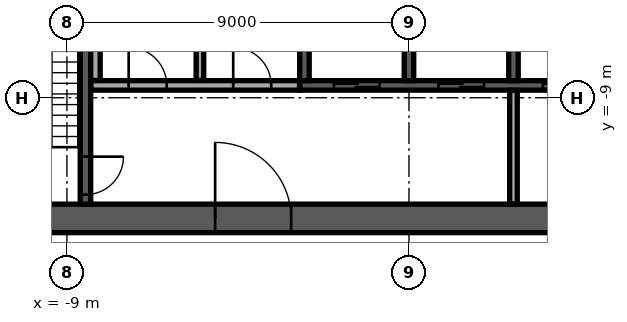
"""IFC4 building model, lengths in metres.
Left out: names, types, materials, properties, quantities, classifications, styles, units other than length and angle.
Written with IfcOpenShell. Run it as: python <this file> out.ifc"""

import sys

from ifc_helpers import new_model, si_unit, direction, frame, frame_2d, origin, place, context, subcontext, project, spatial, rectangle, extrude, element, fill, save


model = new_model("IFC4")
c1 = context("Model", 3, precision=1e-05, world=origin(), true_north=direction((0.0, 1.0)))
c2 = subcontext(c1, "Body", "Model", "MODEL_VIEW")
j1 = project(units=[si_unit("LENGTHUNIT", "METRE"), si_unit("PLANEANGLEUNIT", "RADIAN")], contexts=[c1])
p1 = place(None, origin())
s1 = spatial("IfcSite", under=j1, at=p1, CompositionType="ELEMENT")
p2 = place(p1, origin())
s2 = spatial("IfcBuilding", under=s1, at=p2, CompositionType="ELEMENT")
p3 = place(p2, frame((0.0, 0.0, 262.9)))
s3 = spatial("IfcBuildingStorey", under=s2, at=p3, CompositionType="ELEMENT", Elevation=262.9)
p4 = place(p3, frame((-12.55, -12.175, 0.0), z_axis=(0.0, 0.0, 1.0), x_axis=(1.0, 0.0, 0.0)))
e1 = element("IfcWall", 1, at=p4, inside=s3, PredefinedType="SHEAR", context=c2, shape_type="SweptSolid", body=[
    extrude(rectangle(XDim=25.1, YDim=0.75, at=frame_2d((12.55, 0.0))), origin(), (0.0, 0.0, 1.0), 3.64),
])
p5 = place(p4, frame((7.45, 0.0, 0.0)))
e2 = element("IfcOpeningElement", 2, at=p5, cuts=e1, PredefinedType="OPENING", context=c2, shape_type="SweptSolid", body=[
    extrude(rectangle(XDim=2.0, YDim=2.1, at=frame_2d((1.0, 1.05))), frame((0.0, 0.385, 0.0), z_axis=(0.0, -1.0, 0.0), x_axis=(1.0, 0.0, 0.0)), (0.0, 0.0, 1.0), 0.77),
])
p6 = place(p4, frame((17.575, 0.0, 0.0)))
e3 = element("IfcOpeningElement", 3, at=p6, cuts=e1, PredefinedType="OPENING", context=c2, shape_type="SweptSolid", body=[
    extrude(rectangle(XDim=1.2, YDim=2.1, at=frame_2d((0.6, 1.05))), frame((0.0, 0.385, 0.0), z_axis=(0.0, -1.0, 0.0), x_axis=(1.0, 0.0, 0.0)), (0.0, 0.0, 1.0), 0.77),
])
p7 = place(p4, frame((1.725, 0.0, 0.0)))
e4 = element("IfcOpeningElement", 4, at=p7, cuts=e1, PredefinedType="OPENING", context=c2, shape_type="SweptSolid", body=[
    extrude(rectangle(XDim=1.2, YDim=2.1, at=frame_2d((0.6, 1.05))), frame((0.0, 0.385, 0.0), z_axis=(0.0, -1.0, 0.0), x_axis=(1.0, 0.0, 0.0)), (0.0, 0.0, 1.0), 0.77),
])
p8 = place(p4, frame((22.175, 0.0, 0.0)))
e5 = element("IfcOpeningElement", 5, at=p8, cuts=e1, PredefinedType="OPENING", context=c2, shape_type="SweptSolid", body=[
    extrude(rectangle(XDim=1.2, YDim=2.1, at=frame_2d((0.6, 1.05))), frame((0.0, 0.385, 0.0), z_axis=(0.0, -1.0, 0.0), x_axis=(1.0, 0.0, 0.0)), (0.0, 0.0, 1.0), 0.77),
])
p9 = place(p3, frame((-2.875, -8.675, 0.0), z_axis=(0.0, 0.0, 1.0), x_axis=(1.0, 0.0, 0.0)))
e6 = element("IfcWall", 6, at=p9, inside=s3, PredefinedType="SOLIDWALL", context=c2, shape_type="SweptSolid", body=[
    extrude(rectangle(XDim=11.25, YDim=0.25, at=frame_2d((5.625, 0.0))), origin(), (0.0, 0.0, 1.0), 3.64),
])
p10 = place(p9, frame((0.9, 0.0, 0.0)))
e7 = element("IfcOpeningElement", 7, at=p10, cuts=e6, PredefinedType="OPENING", context=c2, shape_type="SweptSolid", body=[
    extrude(rectangle(XDim=1.2, YDim=2.1, at=frame_2d((0.6, 1.05))), frame((0.0, 0.135, 0.0), z_axis=(0.0, -1.0, 0.0), x_axis=(1.0, 0.0, 0.0)), (0.0, 0.0, 1.0), 0.27),
])
p11 = place(p9, frame((3.65, 0.0, 0.0)))
e8 = element("IfcOpeningElement", 8, at=p11, cuts=e6, PredefinedType="OPENING", context=c2, shape_type="SweptSolid", body=[
    extrude(rectangle(XDim=1.2, YDim=2.1, at=frame_2d((0.6, 1.05))), frame((0.0, 0.135, 0.0), z_axis=(0.0, -1.0, 0.0), x_axis=(1.0, 0.0, 0.0)), (0.0, 0.0, 1.0), 0.27),
])
p12 = place(p9, frame((6.4, 0.0, 0.0)))
e9 = element("IfcOpeningElement", 9, at=p12, cuts=e6, PredefinedType="OPENING", context=c2, shape_type="SweptSolid", body=[
    extrude(rectangle(XDim=1.2, YDim=2.1, at=frame_2d((0.6, 1.05))), frame((0.0, 0.135, 0.0), z_axis=(0.0, -1.0, 0.0), x_axis=(1.0, 0.0, 0.0)), (0.0, 0.0, 1.0), 0.27),
])
p13 = place(p9, frame((9.15, 0.0, 0.0)))
e10 = element("IfcOpeningElement", 10, at=p13, cuts=e6, PredefinedType="OPENING", context=c2, shape_type="SweptSolid", body=[
    extrude(rectangle(XDim=1.2, YDim=2.1, at=frame_2d((0.6, 1.05))), frame((0.0, 0.135, 0.0), z_axis=(0.0, -1.0, 0.0), x_axis=(1.0, 0.0, 0.0)), (0.0, 0.0, 1.0), 0.27),
])
for number, where, z_axis, x_axis in (
    (11, (-2.75, -8.55, 0.0), (0.0, 0.0, 1.0), (0.0, 1.0, 0.0)),
    (12, (0.0, -8.55, 0.0), (0.0, 0.0, 1.0), (0.0, 1.0, 0.0)),
    (13, (2.75, -8.55, 0.0), (0.0, 0.0, 1.0), (0.0, 1.0, 0.0)),
):
    element("IfcWall", number, at=place(p3, frame(where, z_axis=z_axis, x_axis=x_axis)), inside=s3, PredefinedType="SOLIDWALL", context=c2, shape_type="SweptSolid", body=[
        extrude(rectangle(XDim=2.7, YDim=0.25, at=frame_2d((1.35, 0.0))), origin(), (0.0, 0.0, 1.0), 3.64),
    ])
p14 = place(p3, frame((-8.512, -4.55, 0.0), z_axis=(0.0, 0.0, 1.0), x_axis=(0.0, -1.0, 0.0)))
e14 = element("IfcWall", 14, at=p14, inside=s3, PredefinedType="SOLIDWALL", context=c2, shape_type="SweptSolid", body=[
    extrude(rectangle(XDim=7.25, YDim=0.275, at=frame_2d((3.625, 0.0))), origin(), (0.0, 0.0, 1.0), 3.64),
])
p15 = place(p14, frame((6.0, 0.0, 0.0)))
e15 = element("IfcOpeningElement", 15, at=p15, cuts=e14, PredefinedType="OPENING", context=c2, shape_type="SweptSolid", body=[
    extrude(rectangle(XDim=1.0, YDim=2.1, at=frame_2d((0.5, 1.05))), frame((0.0, 0.147, 0.0), z_axis=(0.0, -1.0, 0.0), x_axis=(1.0, 0.0, 0.0)), (0.0, 0.0, 1.0), 0.295),
])
p16 = place(p3, frame((2.75, -11.795, 0.0), z_axis=(0.0, 0.0, 1.0), x_axis=(0.0, 1.0, 0.0)))
e16 = element("IfcWall", 16, at=p16, inside=s3, PredefinedType="PARTITIONING", context=c2, shape_type="SweptSolid", body=[
    extrude(rectangle(XDim=2.99, YDim=0.2, at=frame_2d((1.495, 0.0))), origin(), (0.0, 0.0, 1.0), 3.64),
])
p17 = place(p3, frame((-8.37, -8.675, 0.0), z_axis=(0.0, 0.0, 1.0), x_axis=(1.0, 0.0, 0.0)))
e17 = element("IfcWall", 17, at=p17, inside=s3, PredefinedType="PARTITIONING", context=c2, shape_type="SweptSolid", body=[
    extrude(rectangle(XDim=5.49, YDim=0.25, at=frame_2d((2.745, 0.0))), origin(), (0.0, 0.0, 1.0), 3.64),
])
p18 = place(p17, frame((0.995, 0.0, 0.0)))
e18 = element("IfcOpeningElement", 18, at=p18, cuts=e17, PredefinedType="OPENING", context=c2, shape_type="SweptSolid", body=[
    extrude(rectangle(XDim=1.0, YDim=2.1, at=frame_2d((0.5, 1.05))), frame((0.0, 0.135, 0.0), z_axis=(0.0, -1.0, 0.0), x_axis=(1.0, 0.0, 0.0)), (0.0, 0.0, 1.0), 0.27),
])
p19 = place(p17, frame((3.745, 0.0, 0.0)))
e19 = element("IfcOpeningElement", 19, at=p19, cuts=e17, PredefinedType="OPENING", context=c2, shape_type="SweptSolid", body=[
    extrude(rectangle(XDim=1.0, YDim=2.1, at=frame_2d((0.5, 1.05))), frame((0.0, 0.135, 0.0), z_axis=(0.0, -1.0, 0.0), x_axis=(1.0, 0.0, 0.0)), (0.0, 0.0, 1.0), 0.27),
])
p20 = place(p3, frame((-8.25, -8.545, 0.0), z_axis=(0.0, 0.0, 1.0), x_axis=(0.0, 1.0, 0.0)))
e20 = element("IfcWall", 20, at=p20, inside=s3, PredefinedType="PARTITIONING", context=c2, shape_type="SweptSolid", body=[
    extrude(rectangle(XDim=2.69, YDim=0.25, at=frame_2d((1.345, 0.0))), origin(), (0.0, 0.0, 1.0), 3.64),
])
p21 = place(p3, frame((-5.5, -8.545, 0.0), z_axis=(0.0, 0.0, 1.0), x_axis=(0.0, 1.0, 0.0)))
e21 = element("IfcWall", 21, at=p21, inside=s3, PredefinedType="PARTITIONING", context=c2, shape_type="SweptSolid", body=[
    extrude(rectangle(XDim=2.69, YDim=0.2, at=frame_2d((1.345, 0.0))), origin(), (0.0, 0.0, 1.0), 3.64),
])
p22 = place(p3, frame((-8.015, 32.917, 0.0), z_axis=(0.0, 0.0, 1.0), x_axis=(-0.500001675963, -0.866024436165, 0.0)))
e22 = element("IfcWall", 22, at=p22, inside=s3, PredefinedType="STANDARD", context=c2, shape_type="SweptSolid", body=[
    extrude(rectangle(XDim=48.843, YDim=0.6, at=frame_2d((24.421, 0.0))), origin(), (0.0, 0.0, 1.0), 3.64),
])
p23 = place(p22, frame((1.22, 0.0, 0.9)))
e23 = element("IfcOpeningElement", 23, at=p23, cuts=e22, PredefinedType="OPENING", context=c2, shape_type="SweptSolid", body=[
    extrude(rectangle(XDim=2.0, YDim=2.1, at=frame_2d((1.0, 1.05))), frame((0.0, 0.31, 0.0), z_axis=(0.0, -1.0, 0.0), x_axis=(1.0, 0.0, 0.0)), (0.0, 0.0, 1.0), 0.62),
])
p24 = place(p22, frame((5.66, 0.0, 0.9)))
e24 = element("IfcOpeningElement", 24, at=p24, cuts=e22, PredefinedType="OPENING", context=c2, shape_type="SweptSolid", body=[
    extrude(rectangle(XDim=2.0, YDim=2.1, at=frame_2d((1.0, 1.05))), frame((0.0, 0.31, 0.0), z_axis=(0.0, -1.0, 0.0), x_axis=(1.0, 0.0, 0.0)), (0.0, 0.0, 1.0), 0.62),
])
p25 = place(p22, frame((10.101, 0.0, 0.9)))
e25 = element("IfcOpeningElement", 25, at=p25, cuts=e22, PredefinedType="OPENING", context=c2, shape_type="SweptSolid", body=[
    extrude(rectangle(XDim=2.0, YDim=2.1, at=frame_2d((1.0, 1.05))), frame((0.0, 0.31, 0.0), z_axis=(0.0, -1.0, 0.0), x_axis=(1.0, 0.0, 0.0)), (0.0, 0.0, 1.0), 0.62),
])
p26 = place(p22, frame((14.541, 0.0, 0.9)))
e26 = element("IfcOpeningElement", 26, at=p26, cuts=e22, PredefinedType="OPENING", context=c2, shape_type="SweptSolid", body=[
    extrude(rectangle(XDim=2.0, YDim=2.1, at=frame_2d((1.0, 1.05))), frame((0.0, 0.31, 0.0), z_axis=(0.0, -1.0, 0.0), x_axis=(1.0, 0.0, 0.0)), (0.0, 0.0, 1.0), 0.62),
])
p27 = place(p22, frame((18.981, 0.0, 0.9)))
e27 = element("IfcOpeningElement", 27, at=p27, cuts=e22, PredefinedType="OPENING", context=c2, shape_type="SweptSolid", body=[
    extrude(rectangle(XDim=2.0, YDim=2.1, at=frame_2d((1.0, 1.05))), frame((0.0, 0.31, 0.0), z_axis=(0.0, -1.0, 0.0), x_axis=(1.0, 0.0, 0.0)), (0.0, 0.0, 1.0), 0.62),
])
p28 = place(p22, frame((23.422, 0.0, 0.9)))
e28 = element("IfcOpeningElement", 28, at=p28, cuts=e22, PredefinedType="OPENING", context=c2, shape_type="SweptSolid", body=[
    extrude(rectangle(XDim=2.0, YDim=2.1, at=frame_2d((1.0, 1.05))), frame((0.0, 0.31, 0.0), z_axis=(0.0, -1.0, 0.0), x_axis=(1.0, 0.0, 0.0)), (0.0, 0.0, 1.0), 0.62),
])
p29 = place(p22, frame((27.862, 0.0, 0.9)))
e29 = element("IfcOpeningElement", 29, at=p29, cuts=e22, PredefinedType="OPENING", context=c2, shape_type="SweptSolid", body=[
    extrude(rectangle(XDim=2.0, YDim=2.1, at=frame_2d((1.0, 1.05))), frame((0.0, 0.31, 0.0), z_axis=(0.0, -1.0, 0.0), x_axis=(1.0, 0.0, 0.0)), (0.0, 0.0, 1.0), 0.62),
])
p30 = place(p22, frame((32.302, 0.0, 0.9)))
e30 = element("IfcOpeningElement", 30, at=p30, cuts=e22, PredefinedType="OPENING", context=c2, shape_type="SweptSolid", body=[
    extrude(rectangle(XDim=2.0, YDim=2.1, at=frame_2d((1.0, 1.05))), frame((0.0, 0.31, 0.0), z_axis=(0.0, -1.0, 0.0), x_axis=(1.0, 0.0, 0.0)), (0.0, 0.0, 1.0), 0.62),
])
p31 = place(p22, frame((36.742, 0.0, 0.9)))
e31 = element("IfcOpeningElement", 31, at=p31, cuts=e22, PredefinedType="OPENING", context=c2, shape_type="SweptSolid", body=[
    extrude(rectangle(XDim=2.0, YDim=2.1, at=frame_2d((1.0, 1.05))), frame((0.0, 0.31, 0.0), z_axis=(0.0, -1.0, 0.0), x_axis=(1.0, 0.0, 0.0)), (0.0, 0.0, 1.0), 0.62),
])
p32 = place(p22, frame((41.183, 0.0, 0.9)))
e32 = element("IfcOpeningElement", 32, at=p32, cuts=e22, PredefinedType="OPENING", context=c2, shape_type="SweptSolid", body=[
    extrude(rectangle(XDim=2.0, YDim=2.1, at=frame_2d((1.0, 1.05))), frame((0.0, 0.31, 0.0), z_axis=(0.0, -1.0, 0.0), x_axis=(1.0, 0.0, 0.0)), (0.0, 0.0, 1.0), 0.62),
])
p33 = place(p22, frame((45.623, 0.0, 0.9)))
e33 = element("IfcOpeningElement", 33, at=p33, cuts=e22, PredefinedType="OPENING", context=c2, shape_type="SweptSolid", body=[
    extrude(rectangle(XDim=2.0, YDim=2.1, at=frame_2d((1.0, 1.05))), frame((0.0, 0.31, 0.0), z_axis=(0.0, -1.0, 0.0), x_axis=(1.0, 0.0, 0.0)), (0.0, 0.0, 1.0), 0.62),
])
p34 = place(p3, frame((-26.744, -7.073, 0.0), z_axis=(0.0, 0.0, 1.0), x_axis=(0.866020890374, -0.500007817374, 0.0)))
e34 = element("IfcWall", 34, at=p34, inside=s3, PredefinedType="PARTITIONING", context=c2, shape_type="SweptSolid", body=[
    extrude(rectangle(XDim=39.324, YDim=0.15, at=frame_2d((19.662, 0.0))), origin(), (0.0, 0.0, 1.0), 3.04),
])
p35 = place(p34, frame((14.505, 0.0, 0.0)))
e35 = element("IfcOpeningElement", 35, at=p35, cuts=e34, PredefinedType="OPENING", context=c2, shape_type="SweptSolid", body=[
    extrude(rectangle(XDim=1.0, YDim=2.1, at=frame_2d((0.5, 1.05))), frame((0.0, 0.085, 0.0), z_axis=(0.0, -1.0, 0.0), x_axis=(1.0, 0.0, 0.0)), (0.0, 0.0, 1.0), 0.17),
])
p36 = place(p34, frame((22.632, 0.0, 0.0)))
e36 = element("IfcOpeningElement", 36, at=p36, cuts=e34, PredefinedType="OPENING", context=c2, shape_type="SweptSolid", body=[
    extrude(rectangle(XDim=1.0, YDim=2.1, at=frame_2d((0.5, 1.05))), frame((0.0, 0.085, 0.0), z_axis=(0.0, -1.0, 0.0), x_axis=(1.0, 0.0, 0.0)), (0.0, 0.0, 1.0), 0.17),
])
p37 = place(p34, frame((36.852, 0.0, 0.0)))
e37 = element("IfcOpeningElement", 37, at=p37, cuts=e34, PredefinedType="OPENING", context=c2, shape_type="SweptSolid", body=[
    extrude(rectangle(XDim=1.8, YDim=2.1, at=frame_2d((0.9, 1.05))), frame((0.0, 0.085, 0.0), z_axis=(0.0, -1.0, 0.0), x_axis=(1.0, 0.0, 0.0)), (0.0, 0.0, 1.0), 0.17),
])
p38 = place(p34, frame((29.852, 0.0, 0.0)))
e38 = element("IfcOpeningElement", 38, at=p38, cuts=e34, PredefinedType="OPENING", context=c2, shape_type="SweptSolid", body=[
    extrude(rectangle(XDim=1.0, YDim=2.1, at=frame_2d((0.5, 1.05))), frame((0.0, 0.085, 0.0), z_axis=(0.0, -1.0, 0.0), x_axis=(1.0, 0.0, 0.0)), (0.0, 0.0, 1.0), 0.17),
])
p39 = place(p5, origin())
e39 = element("IfcDoor", 39, at=p39, inside=s3, OperationType="SINGLE_SWING_LEFT", PredefinedType="DOOR", context=c2, shape_type="SweptSolid", body=[
    extrude(rectangle(XDim=2.0, YDim=2.1, at=frame_2d((1.0, 1.05))), frame((0.0, 0.025, 0.0), z_axis=(0.0, -1.0, 0.0), x_axis=(1.0, 0.0, 0.0)), (0.0, 0.0, 1.0), 0.05),
])
fill(e2, e39)
p40 = place(p10, origin())
e40 = element("IfcDoor", 40, at=p40, inside=s3, OperationType="DOUBLE_DOOR_SLIDING", PredefinedType="DOOR", context=c2, shape_type="SweptSolid", body=[
    extrude(rectangle(XDim=1.2, YDim=2.1, at=frame_2d((0.6, 1.05))), frame((0.0, 0.025, 0.0), z_axis=(0.0, -1.0, 0.0), x_axis=(1.0, 0.0, 0.0)), (0.0, 0.0, 1.0), 0.05),
])
fill(e7, e40)
p41 = place(p11, origin())
e41 = element("IfcDoor", 41, at=p41, inside=s3, OperationType="DOUBLE_DOOR_SLIDING", PredefinedType="DOOR", context=c2, shape_type="SweptSolid", body=[
    extrude(rectangle(XDim=1.2, YDim=2.1, at=frame_2d((0.6, 1.05))), frame((0.0, 0.025, 0.0), z_axis=(0.0, -1.0, 0.0), x_axis=(1.0, 0.0, 0.0)), (0.0, 0.0, 1.0), 0.05),
])
fill(e8, e41)
p42 = place(p12, origin())
e42 = element("IfcDoor", 42, at=p42, inside=s3, OperationType="DOUBLE_DOOR_SLIDING", PredefinedType="DOOR", context=c2, shape_type="SweptSolid", body=[
    extrude(rectangle(XDim=1.2, YDim=2.1, at=frame_2d((0.6, 1.05))), frame((0.0, 0.025, 0.0), z_axis=(0.0, -1.0, 0.0), x_axis=(1.0, 0.0, 0.0)), (0.0, 0.0, 1.0), 0.05),
])
fill(e9, e42)
p43 = place(p15, origin())
e43 = element("IfcDoor", 43, at=p43, inside=s3, OperationType="SINGLE_SWING_LEFT", PredefinedType="DOOR", context=c2, shape_type="SweptSolid", body=[
    extrude(rectangle(XDim=1.0, YDim=2.1, at=frame_2d((0.5, 1.05))), frame((0.0, 0.025, 0.0), z_axis=(0.0, -1.0, 0.0), x_axis=(1.0, 0.0, 0.0)), (0.0, 0.0, 1.0), 0.05),
])
fill(e15, e43)
p44 = place(p18, origin())
e44 = element("IfcDoor", 44, at=p44, inside=s3, OperationType="SINGLE_SWING_LEFT", PredefinedType="DOOR", context=c2, shape_type="SweptSolid", body=[
    extrude(rectangle(XDim=1.0, YDim=2.1, at=frame_2d((0.5, 1.05))), frame((0.0, 0.025, 0.0), z_axis=(0.0, -1.0, 0.0), x_axis=(1.0, 0.0, 0.0)), (0.0, 0.0, 1.0), 0.05),
])
fill(e18, e44)
p45 = place(p19, origin())
e45 = element("IfcDoor", 45, at=p45, inside=s3, OperationType="SINGLE_SWING_LEFT", PredefinedType="DOOR", context=c2, shape_type="SweptSolid", body=[
    extrude(rectangle(XDim=1.0, YDim=2.1, at=frame_2d((0.5, 1.05))), frame((0.0, 0.025, 0.0), z_axis=(0.0, -1.0, 0.0), x_axis=(1.0, 0.0, 0.0)), (0.0, 0.0, 1.0), 0.05),
])
fill(e19, e45)
save(model, sys.argv[1])
